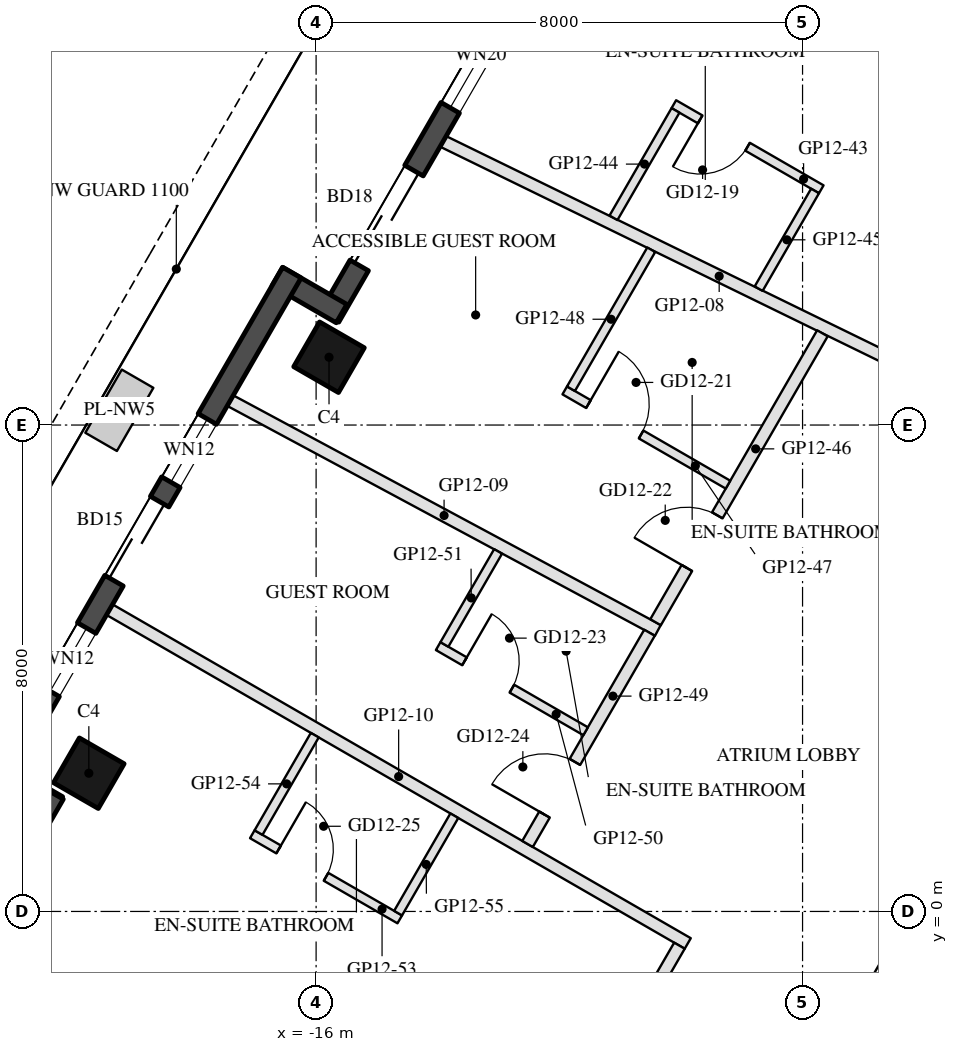
"""IFC4 building model, lengths in metres.
Left out: names, types, materials, properties, quantities, classifications, styles, units other than length and angle.
Written with IfcOpenShell. Run it as: python <this file> out.ifc"""

import sys

from ifc_helpers import new_model, si_unit, direction, frame, frame_2d, origin, origin_2d, place, context, subcontext, project, spatial, rectangle, hollow_rectangle, extrude, element, fill, save


model = new_model("IFC4")
c1 = context("Model", 3, precision=1e-05, world=origin(), true_north=direction((0.0, 1.0)))
c2 = subcontext(c1, "Body", "Model", "MODEL_VIEW")
j1 = project(units=[si_unit("LENGTHUNIT", "METRE"), si_unit("PLANEANGLEUNIT", "RADIAN")], contexts=[c1])
p1 = place(None, origin())
s1 = spatial("IfcSite", under=j1, at=p1, CompositionType="ELEMENT")
p2 = place(p1, origin())
s2 = spatial("IfcBuilding", under=s1, at=p2, CompositionType="ELEMENT")
p3 = place(p2, frame((0.0, 0.0, 146.6)))
s3 = spatial("IfcBuildingStorey", under=s2, at=p3, CompositionType="ELEMENT", Elevation=146.6)
for number, where, z_axis, x_axis in (
    (1, (-15.788, 9.115, 0.0), (0.0, 0.0, 1.0), (0.5, 0.866, 0.0)),
    (2, (-19.738, 2.273, 0.0), (0.0, 0.0, 1.0), (0.5, 0.866, 0.0)),
):
    element("IfcColumn", number, at=place(p3, frame(where, z_axis=z_axis, x_axis=x_axis)), inside=s3, PredefinedType="COLUMN", context=c2, shape_type="SweptSolid", body=[
        extrude(hollow_rectangle(XDim=0.85, YDim=0.85, WallThickness=0.04, at=origin_2d()), origin(), (0.0, 0.0, 1.0), 3.7),
    ])
p4 = place(p3, frame((-12.409, 15.617, 0.0), z_axis=(0.0, 0.0, 1.0), x_axis=(-0.500003597184, -0.866023326939, 0.0)))
e3 = element("IfcWall", 3, at=p4, inside=s3, PredefinedType="SOLIDWALL", context=c2, shape_type="SweptSolid", body=[
    extrude(rectangle(XDim=6.74, YDim=0.35, at=frame_2d((3.37, 0.0))), origin(), (0.0, 0.0, 1.0), 3.55),
])
p5 = place(p4, frame((0.77, 0.0, 0.3)))
e4 = element("IfcOpeningElement", 4, at=p5, cuts=e3, PredefinedType="OPENING", context=c2, shape_type="SweptSolid", body=[
    extrude(rectangle(XDim=2.0, YDim=2.65, at=frame_2d((1.0, 1.325))), frame((0.0, 0.185, 0.0), z_axis=(0.0, -1.0, 0.0), x_axis=(1.0, 0.0, 0.0)), (0.0, 0.0, 1.0), 0.37),
])
p6 = place(p4, frame((3.964, 0.0, 0.0)))
e5 = element("IfcOpeningElement", 5, at=p6, cuts=e3, PredefinedType="OPENING", context=c2, shape_type="SweptSolid", body=[
    extrude(rectangle(XDim=1.8, YDim=2.4, at=frame_2d((0.9, 1.2))), frame((0.0, 0.185, 0.0), z_axis=(0.0, -1.0, 0.0), x_axis=(1.0, 0.0, 0.0)), (0.0, 0.0, 1.0), 0.37),
])
p7 = place(p3, frame((-15.581, 9.833, 0.0), z_axis=(0.0, 0.0, 1.0), x_axis=(-0.866055662726, 0.499947586314, 0.0)))
e6 = element("IfcWall", 6, at=p7, inside=s3, PredefinedType="SOLIDWALL", context=c2, shape_type="SweptSolid", body=[
    extrude(rectangle(XDim=1.22, YDim=0.35, at=frame_2d((0.61, 0.0))), origin(), (0.0, 0.0, 1.0), 3.55),
])
p8 = place(p3, frame((-16.398, 10.507, 0.0), z_axis=(0.0, 0.0, 1.0), x_axis=(-0.499999142773, -0.866025898704, 0.0)))
e7 = element("IfcWall", 7, at=p8, inside=s3, PredefinedType="SOLIDWALL", context=c2, shape_type="SweptSolid", body=[
    extrude(rectangle(XDim=9.7, YDim=0.35, at=frame_2d((4.85, 0.0))), origin(), (0.0, 0.0, 1.0), 3.55),
])
p9 = place(p8, frame((4.35, 0.0, 0.0)))
e8 = element("IfcOpeningElement", 8, at=p9, cuts=e7, PredefinedType="OPENING", context=c2, shape_type="SweptSolid", body=[
    extrude(rectangle(XDim=1.5, YDim=2.4, at=frame_2d((0.75, 1.2))), frame((0.0, 0.185, 0.0), z_axis=(0.0, -1.0, 0.0), x_axis=(1.0, 0.0, 0.0)), (0.0, 0.0, 1.0), 0.37),
])
p10 = place(p8, frame((2.78, 0.0, 0.3)))
e9 = element("IfcOpeningElement", 9, at=p10, cuts=e7, PredefinedType="OPENING", context=c2, shape_type="SweptSolid", body=[
    extrude(rectangle(XDim=1.2, YDim=2.65, at=frame_2d((0.6, 1.325))), frame((0.0, 0.185, 0.0), z_axis=(0.0, -1.0, 0.0), x_axis=(1.0, 0.0, 0.0)), (0.0, 0.0, 1.0), 0.37),
])
p11 = place(p8, frame((6.75, 0.0, 0.3)))
e10 = element("IfcOpeningElement", 10, at=p11, cuts=e7, PredefinedType="OPENING", context=c2, shape_type="SweptSolid", body=[
    extrude(rectangle(XDim=1.2, YDim=2.65, at=frame_2d((0.6, 1.325))), frame((0.0, 0.185, 0.0), z_axis=(0.0, -1.0, 0.0), x_axis=(1.0, 0.0, 0.0)), (0.0, 0.0, 1.0), 0.37),
])
p12 = place(p3, frame((-21.312, 2.346, 0.0), z_axis=(0.0, 0.0, 1.0), x_axis=(0.866005645448, -0.500034220881, 0.0)))
e11 = element("IfcWall", 11, at=p12, inside=s3, PredefinedType="SOLIDWALL", context=c2, shape_type="SweptSolid", body=[
    extrude(rectangle(XDim=1.22, YDim=0.35, at=frame_2d((0.61, 0.0))), origin(), (0.0, 0.0, 1.0), 3.55),
])
p13 = place(p3, frame((-20.309, 1.934, 0.0), z_axis=(0.0, 0.0, 1.0), x_axis=(-0.499992114976, -0.866029956157, 0.0)))
e12 = element("IfcWall", 12, at=p13, inside=s3, PredefinedType="SOLIDWALL", context=c2, shape_type="SweptSolid", body=[
    extrude(rectangle(XDim=6.74, YDim=0.35, at=frame_2d((3.37, 0.0))), origin(), (0.0, 0.0, 1.0), 3.55),
])
p14 = place(p13, frame((0.77, 0.0, 0.0)))
e13 = element("IfcOpeningElement", 13, at=p14, cuts=e12, PredefinedType="OPENING", context=c2, shape_type="SweptSolid", body=[
    extrude(rectangle(XDim=2.4, YDim=2.4, at=frame_2d((1.2, 1.2))), frame((0.0, 0.185, 0.0), z_axis=(0.0, -1.0, 0.0), x_axis=(1.0, 0.0, 0.0)), (0.0, 0.0, 1.0), 0.37),
])
p15 = place(p13, frame((3.47, 0.0, 0.3)))
e14 = element("IfcOpeningElement", 14, at=p15, cuts=e12, PredefinedType="OPENING", context=c2, shape_type="SweptSolid", body=[
    extrude(rectangle(XDim=2.9, YDim=2.65, at=frame_2d((1.45, 1.325))), frame((0.0, 0.185, 0.0), z_axis=(0.0, -1.0, 0.0), x_axis=(1.0, 0.0, 0.0)), (0.0, 0.0, 1.0), 0.37),
])
p16 = place(p3, frame((-13.911, 12.665, 0.0), z_axis=(0.0, 0.0, 1.0), x_axis=(0.898639294085, -0.438688293811, 0.0)))
e15 = element("IfcWall", 15, at=p16, inside=s3, PredefinedType="PARTITIONING", context=c2, shape_type="SweptSolid", body=[
    extrude(rectangle(XDim=10.104, YDim=0.2, at=frame_2d((5.052, 0.0))), origin(), (0.0, 0.0, 1.0), 2.95),
])
p17 = place(p3, frame((-17.412, 8.402, 0.0), z_axis=(0.0, 0.0, 1.0), x_axis=(0.880917469793, -0.473269913912, 0.0)))
e16 = element("IfcWall", 16, at=p17, inside=s3, PredefinedType="PARTITIONING", context=c2, shape_type="SweptSolid", body=[
    extrude(rectangle(XDim=7.984, YDim=0.2, at=frame_2d((3.992, 0.0))), origin(), (0.0, 0.0, 1.0), 3.06),
])
p18 = place(p3, frame((-19.397, 4.963, 0.0), z_axis=(0.0, 0.0, 1.0), x_axis=(0.866027479907, -0.499996404033, 0.0)))
e17 = element("IfcWall", 17, at=p18, inside=s3, PredefinedType="PARTITIONING", context=c2, shape_type="SweptSolid", body=[
    extrude(rectangle(XDim=10.98, YDim=0.2, at=frame_2d((5.49, 0.0))), origin(), (0.0, 0.0, 1.0), 3.06),
])
p19 = place(p3, frame((-7.692, 11.877, 0.0), z_axis=(0.0, 0.0, 1.0), x_axis=(-0.866034573852, 0.49998411664, 0.0)))
e18 = element("IfcWall", 18, at=p19, inside=s3, PredefinedType="PARTITIONING", context=c2, shape_type="SweptSolid", body=[
    extrude(rectangle(XDim=2.8, YDim=0.15, at=frame_2d((1.4, 0.0))), origin(), (0.0, 0.0, 1.0), 3.55),
])
p20 = place(p19, frame((1.4, 0.0, 0.0)))
e19 = element("IfcOpeningElement", 19, at=p20, cuts=e18, PredefinedType="OPENING", context=c2, shape_type="SweptSolid", body=[
    extrude(rectangle(XDim=0.9, YDim=2.1, at=frame_2d((0.45, 1.05))), frame((0.0, 0.085, 0.0), z_axis=(0.0, -1.0, 0.0), x_axis=(1.0, 0.0, 0.0)), (0.0, 0.0, 1.0), 0.17),
])
p21 = place(p3, frame((-10.089, 13.175, 0.0), z_axis=(0.0, 0.0, 1.0), x_axis=(-0.499988401207, -0.866032100247, 0.0)))
e20 = element("IfcWall", 20, at=p21, inside=s3, PredefinedType="PARTITIONING", context=c2, shape_type="SweptSolid", body=[
    extrude(rectangle(XDim=2.04, YDim=0.15, at=frame_2d((1.02, 0.0))), origin(), (0.0, 0.0, 1.0), 3.55),
])
p22 = place(p3, frame((-7.794, 11.85, 0.0), z_axis=(0.0, 0.0, 1.0), x_axis=(-0.500003477455, -0.866023396066, 0.0)))
e21 = element("IfcWall", 21, at=p22, inside=s3, PredefinedType="PARTITIONING", context=c2, shape_type="SweptSolid", body=[
    extrude(rectangle(XDim=1.855, YDim=0.15, at=frame_2d((0.927, 0.0))), origin(), (0.0, 0.0, 1.0), 3.55),
])
p23 = place(p3, frame((-10.417, 4.757, 0.0), z_axis=(0.0, 0.0, 1.0), x_axis=(0.50000105825, 0.866024792803, 0.0)))
e22 = element("IfcWall", 22, at=p23, inside=s3, PredefinedType="PARTITIONING", context=c2, shape_type="SweptSolid", body=[
    extrude(rectangle(XDim=5.487, YDim=0.2, at=frame_2d((2.743, 0.0))), origin(), (0.0, 0.0, 1.0), 2.95),
])
p24 = place(p23, frame((1.03, 0.0, 0.0)))
e23 = element("IfcOpeningElement", 23, at=p24, cuts=e22, PredefinedType="OPENING", context=c2, shape_type="SweptSolid", body=[
    extrude(rectangle(XDim=1.0, YDim=2.1, at=frame_2d((0.5, 1.05))), frame((0.0, 0.11, 0.0), z_axis=(0.0, -1.0, 0.0), x_axis=(1.0, 0.0, 0.0)), (0.0, 0.0, 1.0), 0.22),
])
p25 = place(p3, frame((-11.911, 8.57, 0.0), z_axis=(0.0, 0.0, 1.0), x_axis=(0.86600983753, -0.500026960575, 0.0)))
e24 = element("IfcWall", 24, at=p25, inside=s3, PredefinedType="PARTITIONING", context=c2, shape_type="SweptSolid", body=[
    extrude(rectangle(XDim=3.1, YDim=0.15, at=frame_2d((1.55, 0.0))), origin(), (0.0, 0.0, 1.0), 3.55),
])
p26 = place(p25, frame((0.45, 0.0, 0.0)))
e25 = element("IfcOpeningElement", 25, at=p26, cuts=e24, PredefinedType="OPENING", context=c2, shape_type="SweptSolid", body=[
    extrude(rectangle(XDim=1.0, YDim=2.1, at=frame_2d((0.5, 1.05))), frame((0.0, 0.085, 0.0), z_axis=(0.0, -1.0, 0.0), x_axis=(1.0, 0.0, 0.0)), (0.0, 0.0, 1.0), 0.17),
])
p27 = place(p3, frame((-10.489, 10.883, 0.0), z_axis=(0.0, 0.0, 1.0), x_axis=(-0.500018690203, -0.866014612722, 0.0)))
e26 = element("IfcWall", 26, at=p27, inside=s3, PredefinedType="PARTITIONING", context=c2, shape_type="SweptSolid", body=[
    extrude(rectangle(XDim=2.64, YDim=0.15, at=frame_2d((1.32, 0.0))), origin(), (0.0, 0.0, 1.0), 2.95),
])
p28 = place(p3, frame((-12.523, 1.11, 0.0), z_axis=(0.0, 0.0, 1.0), x_axis=(0.500021015799, 0.866013269967, 0.0)))
e27 = element("IfcWall", 27, at=p28, inside=s3, PredefinedType="PARTITIONING", context=c2, shape_type="SweptSolid", body=[
    extrude(rectangle(XDim=4.011, YDim=0.2, at=frame_2d((2.005, 0.0))), origin(), (0.0, 0.0, 1.0), 2.95),
])
p29 = place(p28, frame((0.558, 0.0, 0.0)))
e28 = element("IfcOpeningElement", 28, at=p29, cuts=e27, PredefinedType="OPENING", context=c2, shape_type="SweptSolid", body=[
    extrude(rectangle(XDim=1.0, YDim=2.1, at=frame_2d((0.5, 1.05))), frame((0.0, 0.11, 0.0), z_axis=(0.0, -1.0, 0.0), x_axis=(1.0, 0.0, 0.0)), (0.0, 0.0, 1.0), 0.22),
])
p30 = place(p3, frame((-13.993, 4.364, 0.0), z_axis=(0.0, 0.0, 1.0), x_axis=(0.866056369097, -0.49994636267, 0.0)))
e29 = element("IfcWall", 29, at=p30, inside=s3, PredefinedType="PARTITIONING", context=c2, shape_type="SweptSolid", body=[
    extrude(rectangle(XDim=2.8, YDim=0.15, at=frame_2d((1.4, 0.0))), origin(), (0.0, 0.0, 1.0), 3.55),
])
p31 = place(p30, frame((0.5, 0.0, 0.0)))
e30 = element("IfcOpeningElement", 30, at=p31, cuts=e29, PredefinedType="OPENING", context=c2, shape_type="SweptSolid", body=[
    extrude(rectangle(XDim=0.9, YDim=2.1, at=frame_2d((0.45, 1.05))), frame((0.0, 0.085, 0.0), z_axis=(0.0, -1.0, 0.0), x_axis=(1.0, 0.0, 0.0)), (0.0, 0.0, 1.0), 0.17),
])
p32 = place(p3, frame((-13.007, 5.921, 0.0), z_axis=(0.0, 0.0, 1.0), x_axis=(-0.500033502416, -0.866006060292, 0.0)))
e31 = element("IfcWall", 31, at=p32, inside=s3, PredefinedType="PARTITIONING", context=c2, shape_type="SweptSolid", body=[
    extrude(rectangle(XDim=1.767, YDim=0.15, at=frame_2d((0.883, 0.0))), origin(), (0.0, 0.0, 1.0), 3.55),
])
p33 = place(p3, frame((-12.269, -4.45, 0.0), z_axis=(0.0, 0.0, 1.0), x_axis=(0.500000259638, 0.866025253883, 0.0)))
e32 = element("IfcWall", 32, at=p33, inside=s3, PredefinedType="PARTITIONING", context=c2, shape_type="SweptSolid", body=[
    extrude(rectangle(XDim=4.488, YDim=0.2, at=frame_2d((2.244, 0.0))), origin(), (0.0, 0.0, 1.0), 2.95),
])
p34 = place(p33, frame((1.744, 0.0, 0.0)))
e33 = element("IfcOpeningElement", 33, at=p34, cuts=e32, PredefinedType="OPENING", context=c2, shape_type="SweptSolid", body=[
    extrude(rectangle(XDim=1.0, YDim=2.1, at=frame_2d((0.5, 1.05))), frame((0.0, 0.11, 0.0), z_axis=(0.0, -1.0, 0.0), x_axis=(1.0, 0.0, 0.0)), (0.0, 0.0, 1.0), 0.22),
])
p35 = place(p3, frame((-17.049, 1.27, 0.0), z_axis=(0.0, 0.0, 1.0), x_axis=(0.866034573852, -0.49998411664, 0.0)))
e34 = element("IfcWall", 34, at=p35, inside=s3, PredefinedType="PARTITIONING", context=c2, shape_type="SweptSolid", body=[
    extrude(rectangle(XDim=2.8, YDim=0.15, at=frame_2d((1.4, 0.0))), origin(), (0.0, 0.0, 1.0), 3.55),
])
p36 = place(p35, frame((0.5, 0.0, 0.0)))
e35 = element("IfcOpeningElement", 35, at=p36, cuts=e34, PredefinedType="OPENING", context=c2, shape_type="SweptSolid", body=[
    extrude(rectangle(XDim=0.9, YDim=2.1, at=frame_2d((0.45, 1.05))), frame((0.0, 0.085, 0.0), z_axis=(0.0, -1.0, 0.0), x_axis=(1.0, 0.0, 0.0)), (0.0, 0.0, 1.0), 0.17),
])
for number, where, z_axis, x_axis in (
    (36, (-16.022, 2.899, 0.0), (0.0, 0.0, 1.0), (-0.5, -0.866, 0.0)),
    (37, (-13.727, 1.574, 0.0), (0.0, 0.0, 1.0), (-0.5, -0.866, 0.0)),
):
    element("IfcWall", number, at=place(p3, frame(where, z_axis=z_axis, x_axis=x_axis)), inside=s3, PredefinedType="PARTITIONING", context=c2, shape_type="SweptSolid", body=[
        extrude(rectangle(XDim=1.85, YDim=0.15, at=frame_2d((0.925, 0.0))), origin(), (0.0, 0.0, 1.0), 3.55),
    ])
p37 = place(p5, origin())
e38 = element("IfcWindow", 38, at=p37, inside=s3, PartitioningType="SINGLE_PANEL", PredefinedType="WINDOW", context=c2, shape_type="SweptSolid", body=[
    extrude(rectangle(XDim=2.0, YDim=2.65, at=frame_2d((1.0, 1.325))), frame((0.0, 0.03, 0.0), z_axis=(0.0, -1.0, 0.0), x_axis=(1.0, 0.0, 0.0)), (0.0, 0.0, 1.0), 0.06),
])
fill(e4, e38)
p38 = place(p6, frame((1.8, 0.0, 0.0), z_axis=(0.0, 0.0, 1.0), x_axis=(-1.0, 0.0, 0.0)))
e39 = element("IfcDoor", 39, at=p38, inside=s3, OperationType="SLIDING_TO_LEFT", PredefinedType="DOOR", context=c2, shape_type="SweptSolid", body=[
    extrude(rectangle(XDim=1.8, YDim=2.4, at=frame_2d((0.9, 1.2))), frame((0.0, 0.025, 0.0), z_axis=(0.0, -1.0, 0.0), x_axis=(1.0, 0.0, 0.0)), (0.0, 0.0, 1.0), 0.05),
])
fill(e5, e39)
p39 = place(p9, frame((1.5, 0.0, 0.0), z_axis=(0.0, 0.0, 1.0), x_axis=(-1.0, 0.0, 0.0)))
e40 = element("IfcDoor", 40, at=p39, inside=s3, OperationType="SLIDING_TO_LEFT", PredefinedType="DOOR", context=c2, shape_type="SweptSolid", body=[
    extrude(rectangle(XDim=1.5, YDim=2.4, at=frame_2d((0.75, 1.2))), frame((0.0, 0.025, 0.0), z_axis=(0.0, -1.0, 0.0), x_axis=(1.0, 0.0, 0.0)), (0.0, 0.0, 1.0), 0.05),
])
fill(e8, e40)
p40 = place(p10, origin())
e41 = element("IfcWindow", 41, at=p40, inside=s3, PartitioningType="SINGLE_PANEL", PredefinedType="WINDOW", context=c2, shape_type="SweptSolid", body=[
    extrude(rectangle(XDim=1.2, YDim=2.65, at=frame_2d((0.6, 1.325))), frame((0.0, 0.03, 0.0), z_axis=(0.0, -1.0, 0.0), x_axis=(1.0, 0.0, 0.0)), (0.0, 0.0, 1.0), 0.06),
])
fill(e9, e41)
p41 = place(p11, origin())
e42 = element("IfcWindow", 42, at=p41, inside=s3, PartitioningType="SINGLE_PANEL", PredefinedType="WINDOW", context=c2, shape_type="SweptSolid", body=[
    extrude(rectangle(XDim=1.2, YDim=2.65, at=frame_2d((0.6, 1.325))), frame((0.0, 0.03, 0.0), z_axis=(0.0, -1.0, 0.0), x_axis=(1.0, 0.0, 0.0)), (0.0, 0.0, 1.0), 0.06),
])
fill(e10, e42)
p42 = place(p20, origin())
e43 = element("IfcDoor", 43, at=p42, inside=s3, OperationType="SINGLE_SWING_RIGHT", PredefinedType="DOOR", context=c2, shape_type="SweptSolid", body=[
    extrude(rectangle(XDim=0.9, YDim=2.1, at=frame_2d((0.45, 1.05))), frame((0.0, 0.025, 0.0), z_axis=(0.0, -1.0, 0.0), x_axis=(1.0, 0.0, 0.0)), (0.0, 0.0, 1.0), 0.05),
])
fill(e19, e43)
p43 = place(p26, origin())
e44 = element("IfcDoor", 44, at=p43, inside=s3, OperationType="SINGLE_SWING_LEFT", PredefinedType="DOOR", context=c2, shape_type="SweptSolid", body=[
    extrude(rectangle(XDim=1.0, YDim=2.1, at=frame_2d((0.5, 1.05))), frame((0.0, 0.025, 0.0), z_axis=(0.0, -1.0, 0.0), x_axis=(1.0, 0.0, 0.0)), (0.0, 0.0, 1.0), 0.05),
])
fill(e25, e44)
p44 = place(p24, origin())
e45 = element("IfcDoor", 45, at=p44, inside=s3, OperationType="SINGLE_SWING_LEFT", PredefinedType="DOOR", context=c2, shape_type="SweptSolid", body=[
    extrude(rectangle(XDim=1.0, YDim=2.1, at=frame_2d((0.5, 1.05))), frame((0.0, 0.025, 0.0), z_axis=(0.0, -1.0, 0.0), x_axis=(1.0, 0.0, 0.0)), (0.0, 0.0, 1.0), 0.05),
])
fill(e23, e45)
p45 = place(p31, origin())
e46 = element("IfcDoor", 46, at=p45, inside=s3, OperationType="SINGLE_SWING_LEFT", PredefinedType="DOOR", context=c2, shape_type="SweptSolid", body=[
    extrude(rectangle(XDim=0.9, YDim=2.1, at=frame_2d((0.45, 1.05))), frame((0.0, 0.025, 0.0), z_axis=(0.0, -1.0, 0.0), x_axis=(1.0, 0.0, 0.0)), (0.0, 0.0, 1.0), 0.05),
])
fill(e30, e46)
p46 = place(p29, origin())
e47 = element("IfcDoor", 47, at=p46, inside=s3, OperationType="SINGLE_SWING_LEFT", PredefinedType="DOOR", context=c2, shape_type="SweptSolid", body=[
    extrude(rectangle(XDim=1.0, YDim=2.1, at=frame_2d((0.5, 1.05))), frame((0.0, 0.025, 0.0), z_axis=(0.0, -1.0, 0.0), x_axis=(1.0, 0.0, 0.0)), (0.0, 0.0, 1.0), 0.05),
])
fill(e28, e47)
p47 = place(p36, origin())
e48 = element("IfcDoor", 48, at=p47, inside=s3, OperationType="SINGLE_SWING_LEFT", PredefinedType="DOOR", context=c2, shape_type="SweptSolid", body=[
    extrude(rectangle(XDim=0.9, YDim=2.1, at=frame_2d((0.45, 1.05))), frame((0.0, 0.025, 0.0), z_axis=(0.0, -1.0, 0.0), x_axis=(1.0, 0.0, 0.0)), (0.0, 0.0, 1.0), 0.05),
])
fill(e35, e48)
save(model, sys.argv[1])
